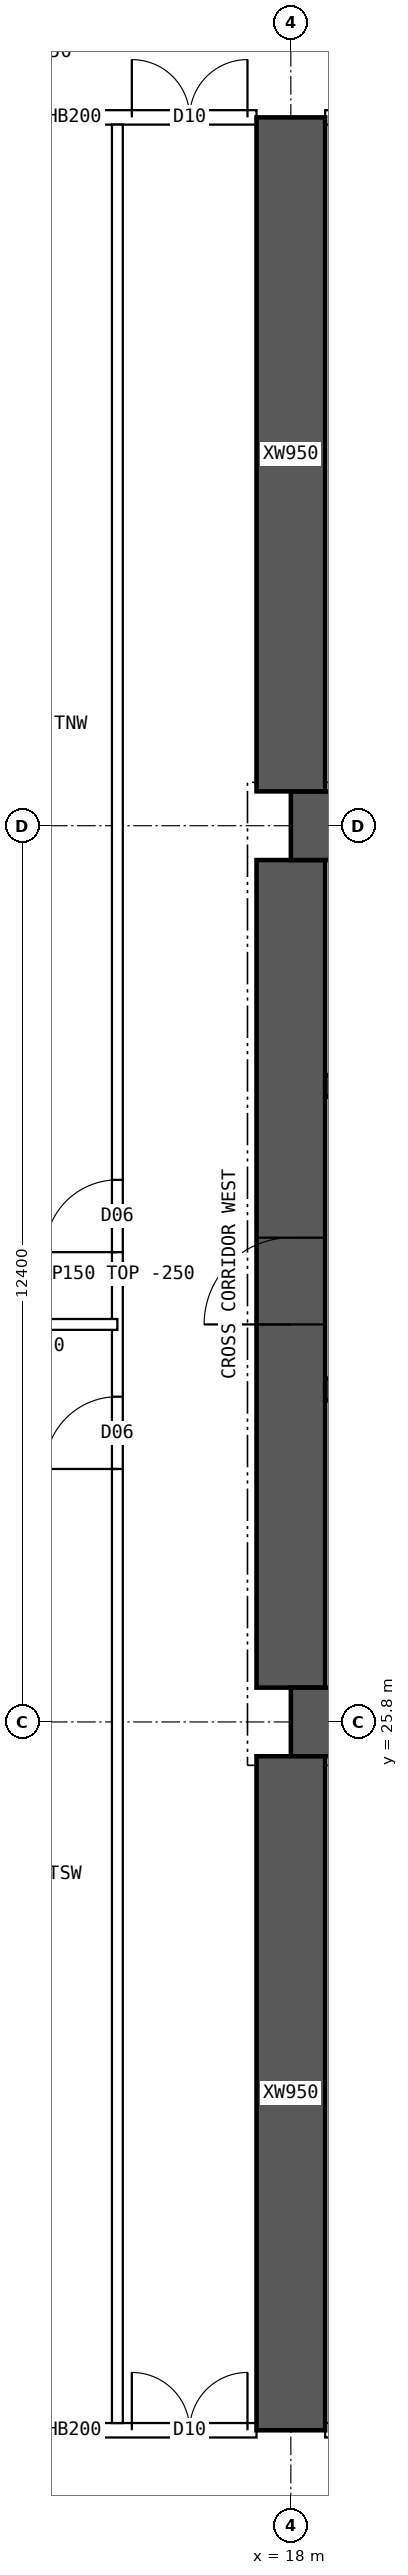
"""IFC4 building model, lengths in metres.
Left out: names, types, materials, properties, quantities, classifications, styles, units other than length and angle.
Written with IfcOpenShell. Run it as: python <this file> out.ifc"""

import sys

from ifc_helpers import new_model, si_unit, direction, frame, frame_2d, origin, place, context, subcontext, project, spatial, rectangle, extrude, element, fill, save


model = new_model("IFC4")
c1 = context("Model", 3, precision=1e-05, world=origin(), true_north=direction((0.0, 1.0)))
c2 = subcontext(c1, "Body", "Model", "MODEL_VIEW")
j1 = project(units=[si_unit("LENGTHUNIT", "METRE"), si_unit("PLANEANGLEUNIT", "RADIAN")], contexts=[c1])
p1 = place(None, origin())
s1 = spatial("IfcSite", under=j1, at=p1, CompositionType="ELEMENT")
p2 = place(p1, origin())
s2 = spatial("IfcBuilding", under=s1, at=p2, CompositionType="ELEMENT")
p3 = place(p2, frame((0.0, 0.0, 99.4)))
s3 = spatial("IfcBuildingStorey", under=s2, at=p3, CompositionType="ELEMENT", Elevation=99.4)
for number, where, z_axis, x_axis in (
    (1, (18.0, 25.8, 0.0), (0.0, 0.0, 1.0), (1.0, 0.0, 0.0)),
    (2, (18.0, 38.2, 0.0), (0.0, 0.0, 1.0), (1.0, 0.0, 0.0)),
):
    element("IfcWall", number, at=place(p3, frame(where, z_axis=z_axis, x_axis=x_axis)), inside=s3, PredefinedType="SHEAR", context=c2, shape_type="SweptSolid", body=[
        extrude(rectangle(XDim=48.0, YDim=0.95, at=frame_2d((24.0, 0.0))), origin(), (0.0, 0.0, 1.0), 3.75),
    ])
p4 = place(p3, frame((18.0, 26.275, 0.0), z_axis=(0.0, 0.0, 1.0), x_axis=(0.0, 1.0, 0.0)))
e3 = element("IfcWall", 3, at=p4, inside=s3, PredefinedType="SHEAR", context=c2, shape_type="SweptSolid", body=[
    extrude(rectangle(XDim=11.45, YDim=0.95, at=frame_2d((5.725, 0.0))), origin(), (0.0, 0.0, 1.0), 3.75),
])
p5 = place(p4, frame((5.025, 0.0, 0.0)))
e4 = element("IfcOpeningElement", 4, at=p5, cuts=e3, PredefinedType="OPENING", context=c2, shape_type="SweptSolid", body=[
    extrude(rectangle(XDim=1.2, YDim=2.1, at=frame_2d((0.6, 1.05))), frame((0.0, 0.485, 0.0), z_axis=(0.0, -1.0, 0.0), x_axis=(1.0, 0.0, 0.0)), (0.0, 0.0, 1.0), 0.97),
])
p6 = place(p3, frame((18.475, 30.4, 0.0), z_axis=(0.0, 0.0, 1.0), x_axis=(1.0, 0.0, 0.0)))
e5 = element("IfcWall", 5, at=p6, inside=s3, PredefinedType="SHEAR", context=c2, shape_type="SweptSolid", body=[
    extrude(rectangle(XDim=47.05, YDim=0.3, at=frame_2d((23.525, 0.0))), origin(), (0.0, 0.0, 1.0), 3.75),
])
p7 = place(p6, frame((0.4, 0.0, 0.0)))
e6 = element("IfcOpeningElement", 6, at=p7, cuts=e5, PredefinedType="OPENING", context=c2, shape_type="SweptSolid", body=[
    extrude(rectangle(XDim=1.0, YDim=2.1, at=frame_2d((0.5, 1.05))), frame((0.0, 0.16, 0.0), z_axis=(0.0, -1.0, 0.0), x_axis=(1.0, 0.0, 0.0)), (0.0, 0.0, 1.0), 0.32),
])
p8 = place(p6, frame((45.65, 0.0, 0.0)))
e7 = element("IfcOpeningElement", 7, at=p8, cuts=e5, PredefinedType="OPENING", context=c2, shape_type="SweptSolid", body=[
    extrude(rectangle(XDim=1.0, YDim=2.1, at=frame_2d((0.5, 1.05))), frame((0.0, 0.16, 0.0), z_axis=(0.0, -1.0, 0.0), x_axis=(1.0, 0.0, 0.0)), (0.0, 0.0, 1.0), 0.32),
])
p9 = place(p6, frame((8.275, 0.0, 0.0)))
e8 = element("IfcOpeningElement", 8, at=p9, cuts=e5, PredefinedType="OPENING", context=c2, shape_type="SweptSolid", body=[
    extrude(rectangle(XDim=1.1, YDim=2.1, at=frame_2d((0.55, 1.05))), frame((0.0, 0.16, 0.0), z_axis=(0.0, -1.0, 0.0), x_axis=(1.0, 0.0, 0.0)), (0.0, 0.0, 1.0), 0.32),
])
p10 = place(p6, frame((10.875, 0.0, 0.0)))
e9 = element("IfcOpeningElement", 9, at=p10, cuts=e5, PredefinedType="OPENING", context=c2, shape_type="SweptSolid", body=[
    extrude(rectangle(XDim=1.1, YDim=2.1, at=frame_2d((0.55, 1.05))), frame((0.0, 0.16, 0.0), z_axis=(0.0, -1.0, 0.0), x_axis=(1.0, 0.0, 0.0)), (0.0, 0.0, 1.0), 0.32),
])
p11 = place(p6, frame((13.475, 0.0, 0.0)))
e10 = element("IfcOpeningElement", 10, at=p11, cuts=e5, PredefinedType="OPENING", context=c2, shape_type="SweptSolid", body=[
    extrude(rectangle(XDim=1.1, YDim=2.1, at=frame_2d((0.55, 1.05))), frame((0.0, 0.16, 0.0), z_axis=(0.0, -1.0, 0.0), x_axis=(1.0, 0.0, 0.0)), (0.0, 0.0, 1.0), 0.32),
])
p12 = place(p6, frame((16.075, 0.0, 0.0)))
e11 = element("IfcOpeningElement", 11, at=p12, cuts=e5, PredefinedType="OPENING", context=c2, shape_type="SweptSolid", body=[
    extrude(rectangle(XDim=1.1, YDim=2.1, at=frame_2d((0.55, 1.05))), frame((0.0, 0.16, 0.0), z_axis=(0.0, -1.0, 0.0), x_axis=(1.0, 0.0, 0.0)), (0.0, 0.0, 1.0), 0.32),
])
p13 = place(p6, frame((18.85, 0.0, 0.0)))
e12 = element("IfcOpeningElement", 12, at=p13, cuts=e5, PredefinedType="OPENING", context=c2, shape_type="SweptSolid", body=[
    extrude(rectangle(XDim=0.9, YDim=2.1, at=frame_2d((0.45, 1.05))), frame((0.0, 0.16, 0.0), z_axis=(0.0, -1.0, 0.0), x_axis=(1.0, 0.0, 0.0)), (0.0, 0.0, 1.0), 0.32),
])
p14 = place(p6, frame((30.142, 0.0, 0.0)))
e13 = element("IfcOpeningElement", 13, at=p14, cuts=e5, PredefinedType="OPENING", context=c2, shape_type="SweptSolid", body=[
    extrude(rectangle(XDim=1.1, YDim=2.1, at=frame_2d((0.55, 1.05))), frame((0.0, 0.16, 0.0), z_axis=(0.0, -1.0, 0.0), x_axis=(1.0, 0.0, 0.0)), (0.0, 0.0, 1.0), 0.32),
])
p15 = place(p6, frame((33.675, 0.0, 0.0)))
e14 = element("IfcOpeningElement", 14, at=p15, cuts=e5, PredefinedType="OPENING", context=c2, shape_type="SweptSolid", body=[
    extrude(rectangle(XDim=1.1, YDim=2.1, at=frame_2d((0.55, 1.05))), frame((0.0, 0.16, 0.0), z_axis=(0.0, -1.0, 0.0), x_axis=(1.0, 0.0, 0.0)), (0.0, 0.0, 1.0), 0.32),
])
p16 = place(p6, frame((37.208, 0.0, 0.0)))
e15 = element("IfcOpeningElement", 15, at=p16, cuts=e5, PredefinedType="OPENING", context=c2, shape_type="SweptSolid", body=[
    extrude(rectangle(XDim=1.1, YDim=2.1, at=frame_2d((0.55, 1.05))), frame((0.0, 0.16, 0.0), z_axis=(0.0, -1.0, 0.0), x_axis=(1.0, 0.0, 0.0)), (0.0, 0.0, 1.0), 0.32),
])
p17 = place(p3, frame((18.475, 34.6, 0.0), z_axis=(0.0, 0.0, 1.0), x_axis=(1.0, 0.0, 0.0)))
e16 = element("IfcWall", 16, at=p17, inside=s3, PredefinedType="SHEAR", context=c2, shape_type="SweptSolid", body=[
    extrude(rectangle(XDim=47.05, YDim=0.3, at=frame_2d((23.525, 0.0))), origin(), (0.0, 0.0, 1.0), 3.75),
])
p18 = place(p17, frame((0.9, 0.0, 0.0)))
e17 = element("IfcOpeningElement", 17, at=p18, cuts=e16, PredefinedType="OPENING", context=c2, shape_type="SweptSolid", body=[
    extrude(rectangle(XDim=1.1, YDim=2.1, at=frame_2d((0.55, 1.05))), frame((0.0, 0.16, 0.0), z_axis=(0.0, -1.0, 0.0), x_axis=(1.0, 0.0, 0.0)), (0.0, 0.0, 1.0), 0.32),
])
p19 = place(p17, frame((45.05, 0.0, 0.0)))
e18 = element("IfcOpeningElement", 18, at=p19, cuts=e16, PredefinedType="OPENING", context=c2, shape_type="SweptSolid", body=[
    extrude(rectangle(XDim=1.1, YDim=2.1, at=frame_2d((0.55, 1.05))), frame((0.0, 0.16, 0.0), z_axis=(0.0, -1.0, 0.0), x_axis=(1.0, 0.0, 0.0)), (0.0, 0.0, 1.0), 0.32),
])
p20 = place(p17, frame((4.125, 0.0, 0.0)))
e19 = element("IfcOpeningElement", 19, at=p20, cuts=e16, PredefinedType="OPENING", context=c2, shape_type="SweptSolid", body=[
    extrude(rectangle(XDim=0.9, YDim=2.1, at=frame_2d((0.45, 1.05))), frame((0.0, 0.16, 0.0), z_axis=(0.0, -1.0, 0.0), x_axis=(1.0, 0.0, 0.0)), (0.0, 0.0, 1.0), 0.32),
])
p21 = place(p17, frame((42.025, 0.0, 0.0)))
e20 = element("IfcOpeningElement", 20, at=p21, cuts=e16, PredefinedType="OPENING", context=c2, shape_type="SweptSolid", body=[
    extrude(rectangle(XDim=0.9, YDim=2.1, at=frame_2d((0.45, 1.05))), frame((0.0, 0.16, 0.0), z_axis=(0.0, -1.0, 0.0), x_axis=(1.0, 0.0, 0.0)), (0.0, 0.0, 1.0), 0.32),
])
p22 = place(p17, frame((8.9, 0.0, 0.0)))
e21 = element("IfcOpeningElement", 21, at=p22, cuts=e16, PredefinedType="OPENING", context=c2, shape_type="SweptSolid", body=[
    extrude(rectangle(XDim=0.9, YDim=2.1, at=frame_2d((0.45, 1.05))), frame((0.0, 0.16, 0.0), z_axis=(0.0, -1.0, 0.0), x_axis=(1.0, 0.0, 0.0)), (0.0, 0.0, 1.0), 0.32),
])
p23 = place(p17, frame((12.874, 0.0, 0.0)))
e22 = element("IfcOpeningElement", 22, at=p23, cuts=e16, PredefinedType="OPENING", context=c2, shape_type="SweptSolid", body=[
    extrude(rectangle(XDim=0.9, YDim=2.1, at=frame_2d((0.45, 1.05))), frame((0.0, 0.16, 0.0), z_axis=(0.0, -1.0, 0.0), x_axis=(1.0, 0.0, 0.0)), (0.0, 0.0, 1.0), 0.32),
])
p24 = place(p17, frame((16.521, 0.0, 0.0)))
e23 = element("IfcOpeningElement", 23, at=p24, cuts=e16, PredefinedType="OPENING", context=c2, shape_type="SweptSolid", body=[
    extrude(rectangle(XDim=0.9, YDim=2.1, at=frame_2d((0.45, 1.05))), frame((0.0, 0.16, 0.0), z_axis=(0.0, -1.0, 0.0), x_axis=(1.0, 0.0, 0.0)), (0.0, 0.0, 1.0), 0.32),
])
p25 = place(p17, frame((20.28, 0.0, 0.0)))
e24 = element("IfcOpeningElement", 24, at=p25, cuts=e16, PredefinedType="OPENING", context=c2, shape_type="SweptSolid", body=[
    extrude(rectangle(XDim=0.9, YDim=2.1, at=frame_2d((0.45, 1.05))), frame((0.0, 0.16, 0.0), z_axis=(0.0, -1.0, 0.0), x_axis=(1.0, 0.0, 0.0)), (0.0, 0.0, 1.0), 0.32),
])
p26 = place(p17, frame((24.686, 0.0, 0.0)))
e25 = element("IfcOpeningElement", 25, at=p26, cuts=e16, PredefinedType="OPENING", context=c2, shape_type="SweptSolid", body=[
    extrude(rectangle(XDim=0.9, YDim=2.1, at=frame_2d((0.45, 1.05))), frame((0.0, 0.16, 0.0), z_axis=(0.0, -1.0, 0.0), x_axis=(1.0, 0.0, 0.0)), (0.0, 0.0, 1.0), 0.32),
])
p27 = place(p17, frame((27.483, 0.0, 0.0)))
e26 = element("IfcOpeningElement", 26, at=p27, cuts=e16, PredefinedType="OPENING", context=c2, shape_type="SweptSolid", body=[
    extrude(rectangle(XDim=0.9, YDim=2.1, at=frame_2d((0.45, 1.05))), frame((0.0, 0.16, 0.0), z_axis=(0.0, -1.0, 0.0), x_axis=(1.0, 0.0, 0.0)), (0.0, 0.0, 1.0), 0.32),
])
p28 = place(p17, frame((29.653, 0.0, 0.0)))
e27 = element("IfcOpeningElement", 27, at=p28, cuts=e16, PredefinedType="OPENING", context=c2, shape_type="SweptSolid", body=[
    extrude(rectangle(XDim=0.9, YDim=2.1, at=frame_2d((0.45, 1.05))), frame((0.0, 0.16, 0.0), z_axis=(0.0, -1.0, 0.0), x_axis=(1.0, 0.0, 0.0)), (0.0, 0.0, 1.0), 0.32),
])
p29 = place(p17, frame((33.452, 0.0, 0.0)))
e28 = element("IfcOpeningElement", 28, at=p29, cuts=e16, PredefinedType="OPENING", context=c2, shape_type="SweptSolid", body=[
    extrude(rectangle(XDim=0.9, YDim=2.1, at=frame_2d((0.45, 1.05))), frame((0.0, 0.16, 0.0), z_axis=(0.0, -1.0, 0.0), x_axis=(1.0, 0.0, 0.0)), (0.0, 0.0, 1.0), 0.32),
])
p30 = place(p17, frame((37.403, 0.0, 0.0)))
e29 = element("IfcOpeningElement", 29, at=p30, cuts=e16, PredefinedType="OPENING", context=c2, shape_type="SweptSolid", body=[
    extrude(rectangle(XDim=0.9, YDim=2.1, at=frame_2d((0.45, 1.05))), frame((0.0, 0.16, 0.0), z_axis=(0.0, -1.0, 0.0), x_axis=(1.0, 0.0, 0.0)), (0.0, 0.0, 1.0), 0.32),
])
for number, where, z_axis, x_axis in (
    (30, (18.0, 16.0, 0.0), (0.0, 0.0, 1.0), (0.0, 1.0, 0.0)),
    (31, (18.0, 38.675, 0.0), (0.0, 0.0, 1.0), (0.0, 1.0, 0.0)),
):
    element("IfcWall", number, at=place(p3, frame(where, z_axis=z_axis, x_axis=x_axis)), inside=s3, PredefinedType="SHEAR", context=c2, shape_type="SweptSolid", body=[
        extrude(rectangle(XDim=9.325, YDim=0.95, at=frame_2d((4.663, 0.0))), origin(), (0.0, 0.0, 1.0), 3.75),
    ])
p31 = place(p3, frame((12.475, 16.0, 0.0), z_axis=(0.0, 0.0, 1.0), x_axis=(1.0, 0.0, 0.0)))
e32 = element("IfcWall", 32, at=p31, inside=s3, PredefinedType="SOLIDWALL", context=c2, shape_type="SweptSolid", body=[
    extrude(rectangle(XDim=5.05, YDim=0.2, at=frame_2d((2.525, 0.0))), origin(), (0.0, 0.0, 1.0), 3.5),
])
p32 = place(p31, frame((3.325, 0.0, 0.0)))
e33 = element("IfcOpeningElement", 33, at=p32, cuts=e32, PredefinedType="OPENING", context=c2, shape_type="SweptSolid", body=[
    extrude(rectangle(XDim=1.6, YDim=2.1, at=frame_2d((0.8, 1.05))), frame((0.0, 0.11, 0.0), z_axis=(0.0, -1.0, 0.0), x_axis=(1.0, 0.0, 0.0)), (0.0, 0.0, 1.0), 0.22),
])
p33 = place(p3, frame((18.475, 16.0, 0.0), z_axis=(0.0, 0.0, 1.0), x_axis=(1.0, 0.0, 0.0)))
e34 = element("IfcWall", 34, at=p33, inside=s3, PredefinedType="SOLIDWALL", context=c2, shape_type="SweptSolid", body=[
    extrude(rectangle(XDim=5.05, YDim=0.2, at=frame_2d((2.525, 0.0))), origin(), (0.0, 0.0, 1.0), 3.5),
])
p34 = place(p33, frame((0.35, 0.0, 0.0)))
e35 = element("IfcOpeningElement", 35, at=p34, cuts=e34, PredefinedType="OPENING", context=c2, shape_type="SweptSolid", body=[
    extrude(rectangle(XDim=0.9, YDim=2.1, at=frame_2d((0.45, 1.05))), frame((0.0, 0.11, 0.0), z_axis=(0.0, -1.0, 0.0), x_axis=(1.0, 0.0, 0.0)), (0.0, 0.0, 1.0), 0.22),
])
p35 = place(p33, frame((3.475, 0.0, 0.0)))
e36 = element("IfcOpeningElement", 36, at=p35, cuts=e34, PredefinedType="OPENING", context=c2, shape_type="SweptSolid", body=[
    extrude(rectangle(XDim=0.9, YDim=2.1, at=frame_2d((0.45, 1.05))), frame((0.0, 0.11, 0.0), z_axis=(0.0, -1.0, 0.0), x_axis=(1.0, 0.0, 0.0)), (0.0, 0.0, 1.0), 0.22),
])
p36 = place(p3, frame((12.475, 48.0, 0.0), z_axis=(0.0, 0.0, 1.0), x_axis=(1.0, 0.0, 0.0)))
e37 = element("IfcWall", 37, at=p36, inside=s3, PredefinedType="SOLIDWALL", context=c2, shape_type="SweptSolid", body=[
    extrude(rectangle(XDim=5.05, YDim=0.2, at=frame_2d((2.525, 0.0))), origin(), (0.0, 0.0, 1.0), 3.5),
])
p37 = place(p36, frame((3.325, 0.0, 0.0)))
e38 = element("IfcOpeningElement", 38, at=p37, cuts=e37, PredefinedType="OPENING", context=c2, shape_type="SweptSolid", body=[
    extrude(rectangle(XDim=1.6, YDim=2.1, at=frame_2d((0.8, 1.05))), frame((0.0, 0.11, 0.0), z_axis=(0.0, -1.0, 0.0), x_axis=(1.0, 0.0, 0.0)), (0.0, 0.0, 1.0), 0.22),
])
p38 = place(p3, frame((18.475, 48.0, 0.0), z_axis=(0.0, 0.0, 1.0), x_axis=(1.0, 0.0, 0.0)))
e39 = element("IfcWall", 39, at=p38, inside=s3, PredefinedType="SOLIDWALL", context=c2, shape_type="SweptSolid", body=[
    extrude(rectangle(XDim=5.05, YDim=0.2, at=frame_2d((2.525, 0.0))), origin(), (0.0, 0.0, 1.0), 3.5),
])
p39 = place(p38, frame((0.35, 0.0, 0.0)))
e40 = element("IfcOpeningElement", 40, at=p39, cuts=e39, PredefinedType="OPENING", context=c2, shape_type="SweptSolid", body=[
    extrude(rectangle(XDim=0.9, YDim=2.1, at=frame_2d((0.45, 1.05))), frame((0.0, 0.11, 0.0), z_axis=(0.0, -1.0, 0.0), x_axis=(1.0, 0.0, 0.0)), (0.0, 0.0, 1.0), 0.22),
])
p40 = place(p38, frame((2.665, 0.0, 0.0)))
e41 = element("IfcOpeningElement", 41, at=p40, cuts=e39, PredefinedType="OPENING", context=c2, shape_type="SweptSolid", body=[
    extrude(rectangle(XDim=0.9, YDim=2.1, at=frame_2d((0.45, 1.05))), frame((0.0, 0.11, 0.0), z_axis=(0.0, -1.0, 0.0), x_axis=(1.0, 0.0, 0.0)), (0.0, 0.0, 1.0), 0.22),
])
p41 = place(p3, frame((15.6, 16.1, 0.0), z_axis=(0.0, 0.0, 1.0), x_axis=(0.0, 1.0, 0.0)))
e42 = element("IfcWall", 42, at=p41, inside=s3, PredefinedType="PARTITIONING", context=c2, shape_type="SweptSolid", body=[
    extrude(rectangle(XDim=31.8, YDim=0.15, at=frame_2d((15.9, 0.0))), origin(), (0.0, 0.0, 1.0), 3.5),
])
p42 = place(p41, frame((13.2, 0.0, 0.0)))
e43 = element("IfcOpeningElement", 43, at=p42, cuts=e42, PredefinedType="OPENING", context=c2, shape_type="SweptSolid", body=[
    extrude(rectangle(XDim=1.0, YDim=2.1, at=frame_2d((0.5, 1.05))), frame((0.0, 0.085, 0.0), z_axis=(0.0, -1.0, 0.0), x_axis=(1.0, 0.0, 0.0)), (0.0, 0.0, 1.0), 0.17),
])
p43 = place(p41, frame((16.2, 0.0, 0.0)))
e44 = element("IfcOpeningElement", 44, at=p43, cuts=e42, PredefinedType="OPENING", context=c2, shape_type="SweptSolid", body=[
    extrude(rectangle(XDim=1.0, YDim=2.1, at=frame_2d((0.5, 1.05))), frame((0.0, 0.085, 0.0), z_axis=(0.0, -1.0, 0.0), x_axis=(1.0, 0.0, 0.0)), (0.0, 0.0, 1.0), 0.17),
])
p44 = place(p3, frame((12.0, 31.3, 0.0), z_axis=(0.0, 0.0, 1.0), x_axis=(1.0, 0.0, 0.0)))
e45 = element("IfcWall", 45, at=p44, inside=s3, PredefinedType="PARTITIONING", context=c2, shape_type="SweptSolid", body=[
    extrude(rectangle(XDim=3.6, YDim=0.15, at=frame_2d((1.8, 0.0))), origin(), (0.0, 0.0, 1.0), 3.5),
])
p45 = place(p5, origin())
e46 = element("IfcDoor", 46, at=p45, inside=s3, OperationType="SINGLE_SWING_LEFT", PredefinedType="DOOR", context=c2, shape_type="SweptSolid", body=[
    extrude(rectangle(XDim=1.2, YDim=2.1, at=frame_2d((0.6, 1.05))), frame((0.0, 0.025, 0.0), z_axis=(0.0, -1.0, 0.0), x_axis=(1.0, 0.0, 0.0)), (0.0, 0.0, 1.0), 0.05),
])
fill(e4, e46)
p46 = place(p32, origin())
e47 = element("IfcDoor", 47, at=p46, inside=s3, OperationType="DOUBLE_DOOR_SINGLE_SWING", PredefinedType="DOOR", context=c2, shape_type="SweptSolid", body=[
    extrude(rectangle(XDim=1.6, YDim=2.1, at=frame_2d((0.8, 1.05))), frame((0.0, 0.025, 0.0), z_axis=(0.0, -1.0, 0.0), x_axis=(1.0, 0.0, 0.0)), (0.0, 0.0, 1.0), 0.05),
])
fill(e33, e47)
p47 = place(p37, origin())
e48 = element("IfcDoor", 48, at=p47, inside=s3, OperationType="DOUBLE_DOOR_SINGLE_SWING", PredefinedType="DOOR", context=c2, shape_type="SweptSolid", body=[
    extrude(rectangle(XDim=1.6, YDim=2.1, at=frame_2d((0.8, 1.05))), frame((0.0, 0.025, 0.0), z_axis=(0.0, -1.0, 0.0), x_axis=(1.0, 0.0, 0.0)), (0.0, 0.0, 1.0), 0.05),
])
fill(e38, e48)
p48 = place(p42, origin())
e49 = element("IfcDoor", 49, at=p48, inside=s3, OperationType="SINGLE_SWING_LEFT", PredefinedType="DOOR", context=c2, shape_type="SweptSolid", body=[
    extrude(rectangle(XDim=1.0, YDim=2.1, at=frame_2d((0.5, 1.05))), frame((0.0, 0.025, 0.0), z_axis=(0.0, -1.0, 0.0), x_axis=(1.0, 0.0, 0.0)), (0.0, 0.0, 1.0), 0.05),
])
fill(e43, e49)
p49 = place(p43, origin())
e50 = element("IfcDoor", 50, at=p49, inside=s3, OperationType="SINGLE_SWING_LEFT", PredefinedType="DOOR", context=c2, shape_type="SweptSolid", body=[
    extrude(rectangle(XDim=1.0, YDim=2.1, at=frame_2d((0.5, 1.05))), frame((0.0, 0.025, 0.0), z_axis=(0.0, -1.0, 0.0), x_axis=(1.0, 0.0, 0.0)), (0.0, 0.0, 1.0), 0.05),
])
fill(e44, e50)
save(model, sys.argv[1])
